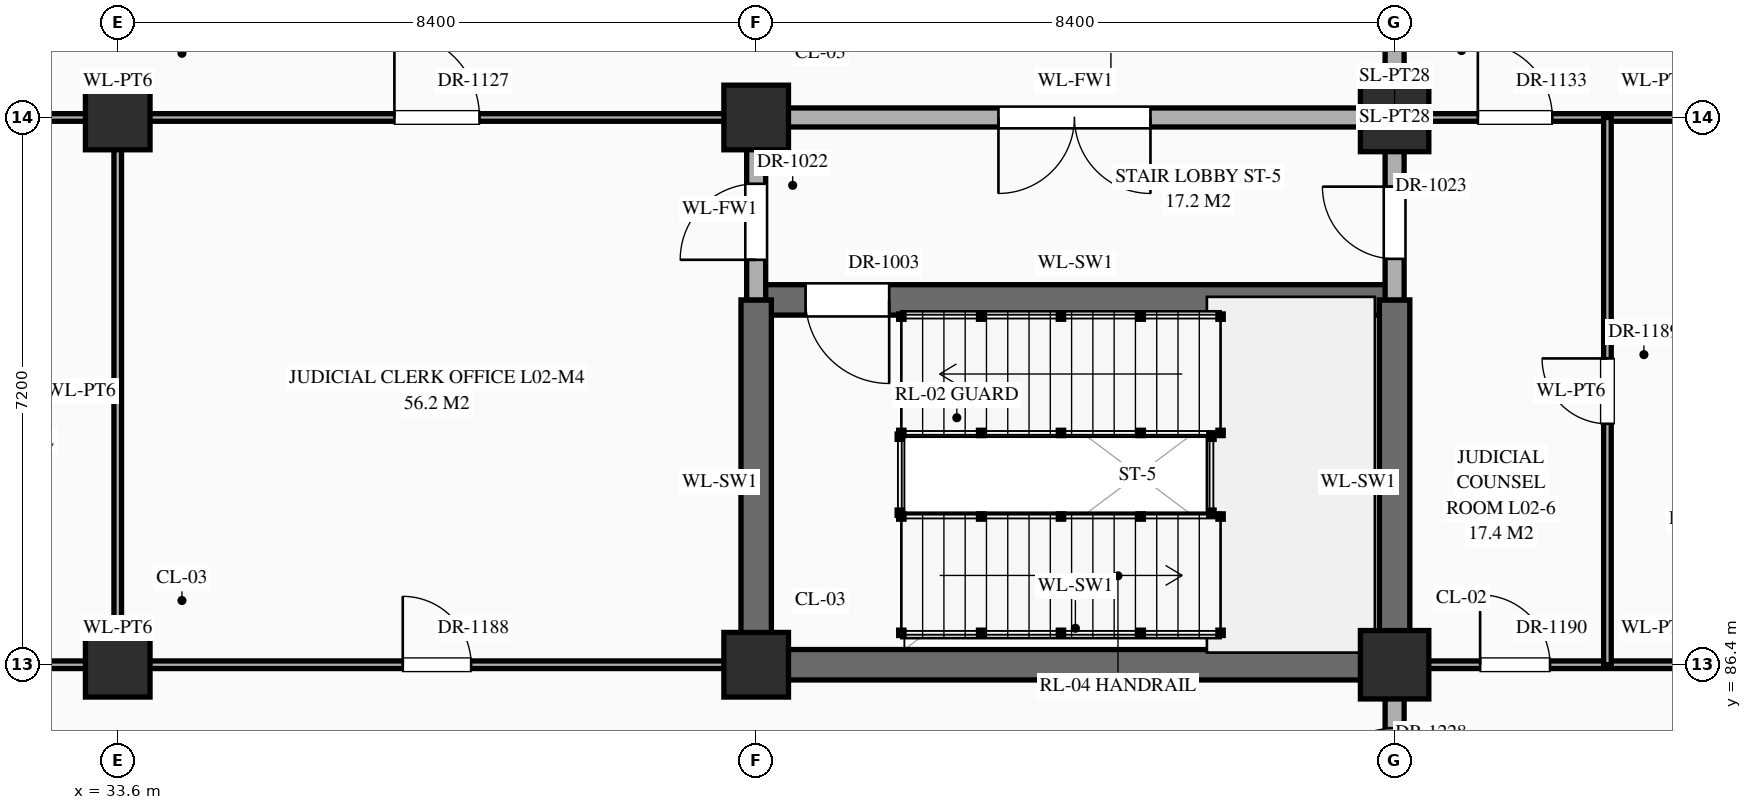
"""IFC4 building model, lengths in metres.
Left out: names, types, materials, properties, quantities, classifications, styles, units other than length and angle.
Written with IfcOpenShell. Run it as: python <this file> out.ifc"""

import sys

from ifc_helpers import new_model, si_unit, direction, frame, frame_2d, origin, origin_2d, place, context, subcontext, project, spatial, rectangle, extrude, element, fill, save


model = new_model("IFC4")
c1 = context("Model", 3, precision=1e-05, world=origin(), true_north=direction((0.0, 1.0)))
c2 = subcontext(c1, "Body", "Model", "MODEL_VIEW")
j1 = project(units=[si_unit("LENGTHUNIT", "METRE"), si_unit("PLANEANGLEUNIT", "RADIAN")], contexts=[c1])
p1 = place(None, origin())
s1 = spatial("IfcSite", under=j1, at=p1, CompositionType="ELEMENT")
p2 = place(p1, origin())
s2 = spatial("IfcBuilding", under=s1, at=p2, CompositionType="ELEMENT")
p3 = place(p2, frame((0.0, 0.0, 5.4)))
s3 = spatial("IfcBuildingStorey", under=s2, at=p3, CompositionType="ELEMENT", Elevation=5.4)
for number, where, z_axis, x_axis in (
    (1, (33.6, 86.4, 0.0), (0.0, 0.0, 1.0), (1.0, 0.0, 0.0)),
    (2, (33.6, 93.6, 0.0), (0.0, 0.0, 1.0), (1.0, 0.0, 0.0)),
    (3, (42.0, 86.4, 0.0), (0.0, 0.0, 1.0), (1.0, 0.0, 0.0)),
    (4, (42.0, 93.6, 0.0), (0.0, 0.0, 1.0), (1.0, 0.0, 0.0)),
):
    element("IfcColumn", number, at=place(p3, frame(where, z_axis=z_axis, x_axis=x_axis)), inside=s3, PredefinedType="COLUMN", context=c2, shape_type="SweptSolid", body=[
        extrude(rectangle(XDim=0.85, YDim=0.85, at=origin_2d()), origin(), (0.0, 0.0, 1.0), 5.4),
    ])
for number, where, z_axis, x_axis in (
    (5, (50.4, 86.4, 0.0), (0.0, 0.0, 1.0), (1.0, 0.0, 0.0)),
    (6, (50.4, 93.6, 0.0), (0.0, 0.0, 1.0), (1.0, 0.0, 0.0)),
):
    element("IfcColumn", number, at=place(p3, frame(where, z_axis=z_axis, x_axis=x_axis)), inside=s3, PredefinedType="COLUMN", context=c2, shape_type="SweptSolid", body=[
        extrude(rectangle(XDim=0.9, YDim=0.9, at=origin_2d()), origin(), (0.0, 0.0, 1.0), 5.4),
    ])
p4 = place(p3, frame((25.2, 86.4, 0.0), z_axis=(0.0, 0.0, 1.0), x_axis=(1.0, 0.0, 0.0)))
e7 = element("IfcWall", 7, at=p4, inside=s3, PredefinedType="STANDARD", context=c2, shape_type="SweptSolid", body=[
    extrude(rectangle(XDim=16.8, YDim=0.1, at=frame_2d((8.4, 0.0))), origin(), (0.0, 0.0, 1.0), 4.27),
])
p5 = place(p4, frame((1.083, 0.0, 0.0)))
e8 = element("IfcOpeningElement", 8, at=p5, cuts=e7, PredefinedType="OPENING", context=c2, shape_type="SweptSolid", body=[
    extrude(rectangle(XDim=0.98, YDim=2.35, at=frame_2d((0.49, 1.175))), frame((0.0, 0.062, 0.0), z_axis=(0.0, -1.0, 0.0), x_axis=(1.0, 0.0, 0.0)), (0.0, 0.0, 1.0), 0.124),
])
p6 = place(p4, frame((3.3, 0.0, 0.0)))
e9 = element("IfcOpeningElement", 9, at=p6, cuts=e7, PredefinedType="OPENING", context=c2, shape_type="SweptSolid", body=[
    extrude(rectangle(XDim=1.8, YDim=2.5, at=frame_2d((0.9, 1.25))), frame((0.0, 0.062, 0.0), z_axis=(0.0, -1.0, 0.0), x_axis=(1.0, 0.0, 0.0)), (0.0, 0.0, 1.0), 0.124),
])
p7 = place(p4, frame((6.258, 0.0, 0.0)))
e10 = element("IfcOpeningElement", 10, at=p7, cuts=e7, PredefinedType="OPENING", context=c2, shape_type="SweptSolid", body=[
    extrude(rectangle(XDim=1.14, YDim=2.4, at=frame_2d((0.57, 1.2))), frame((0.0, 0.062, 0.0), z_axis=(0.0, -1.0, 0.0), x_axis=(1.0, 0.0, 0.0)), (0.0, 0.0, 1.0), 0.124),
])
p8 = place(p4, frame((12.15, 0.0, 0.0)))
e11 = element("IfcOpeningElement", 11, at=p8, cuts=e7, PredefinedType="OPENING", context=c2, shape_type="SweptSolid", body=[
    extrude(rectangle(XDim=0.9, YDim=2.15, at=frame_2d((0.45, 1.075))), frame((0.0, 0.062, 0.0), z_axis=(0.0, -1.0, 0.0), x_axis=(1.0, 0.0, 0.0)), (0.0, 0.0, 1.0), 0.124),
])
p9 = place(p3, frame((42.0, 86.4, 0.0), z_axis=(0.0, 0.0, 1.0), x_axis=(1.0, 0.0, 0.0)))
e12 = element("IfcWall", 12, at=p9, inside=s3, PredefinedType="SHEAR", context=c2, shape_type="SweptSolid", body=[
    extrude(rectangle(XDim=8.4, YDim=0.4, at=frame_2d((4.2, 0.0))), origin(), (0.0, 0.0, 1.0), 5.12),
])
p10 = place(p3, frame((50.4, 86.4, 0.0), z_axis=(0.0, 0.0, 1.0), x_axis=(1.0, 0.0, 0.0)))
e13 = element("IfcWall", 13, at=p10, inside=s3, PredefinedType="STANDARD", context=c2, shape_type="SweptSolid", body=[
    extrude(rectangle(XDim=8.4, YDim=0.1, at=frame_2d((4.2, 0.0))), origin(), (0.0, 0.0, 1.0), 4.27),
])
p11 = place(p10, frame((1.125, 0.0, 0.0)))
e14 = element("IfcOpeningElement", 14, at=p11, cuts=e13, PredefinedType="OPENING", context=c2, shape_type="SweptSolid", body=[
    extrude(rectangle(XDim=0.92, YDim=2.15, at=frame_2d((0.46, 1.075))), frame((0.0, 0.062, 0.0), z_axis=(0.0, -1.0, 0.0), x_axis=(1.0, 0.0, 0.0)), (0.0, 0.0, 1.0), 0.124),
])
p12 = place(p10, frame((3.7, 0.0, 0.0)))
e15 = element("IfcOpeningElement", 15, at=p12, cuts=e13, PredefinedType="OPENING", context=c2, shape_type="SweptSolid", body=[
    extrude(rectangle(XDim=1.0, YDim=2.25, at=frame_2d((0.5, 1.125))), frame((0.0, 0.062, 0.0), z_axis=(0.0, -1.0, 0.0), x_axis=(1.0, 0.0, 0.0)), (0.0, 0.0, 1.0), 0.124),
])
p13 = place(p10, frame((6.295, 0.0, 0.0)))
e16 = element("IfcOpeningElement", 16, at=p13, cuts=e13, PredefinedType="OPENING", context=c2, shape_type="SweptSolid", body=[
    extrude(rectangle(XDim=1.04, YDim=2.2, at=frame_2d((0.52, 1.1))), frame((0.0, 0.062, 0.0), z_axis=(0.0, -1.0, 0.0), x_axis=(1.0, 0.0, 0.0)), (0.0, 0.0, 1.0), 0.124),
])
p14 = place(p3, frame((42.0, 91.2, 0.0), z_axis=(0.0, 0.0, 1.0), x_axis=(1.0, 0.0, 0.0)))
e17 = element("IfcWall", 17, at=p14, inside=s3, PredefinedType="SHEAR", context=c2, shape_type="SweptSolid", body=[
    extrude(rectangle(XDim=8.4, YDim=0.4, at=frame_2d((4.2, 0.0))), origin(), (0.0, 0.0, 1.0), 5.12),
])
p15 = place(p14, frame((0.65, 0.0, 0.0)))
e18 = element("IfcOpeningElement", 18, at=p15, cuts=e17, PredefinedType="OPENING", context=c2, shape_type="SweptSolid", body=[
    extrude(rectangle(XDim=1.1, YDim=2.2, at=frame_2d((0.55, 1.1))), frame((0.0, 0.212, 0.0), z_axis=(0.0, -1.0, 0.0), x_axis=(1.0, 0.0, 0.0)), (0.0, 0.0, 1.0), 0.424),
])
p16 = place(p3, frame((25.2, 93.6, 0.0), z_axis=(0.0, 0.0, 1.0), x_axis=(1.0, 0.0, 0.0)))
e19 = element("IfcWall", 19, at=p16, inside=s3, PredefinedType="STANDARD", context=c2, shape_type="SweptSolid", body=[
    extrude(rectangle(XDim=16.8, YDim=0.1, at=frame_2d((8.4, 0.0))), origin(), (0.0, 0.0, 1.0), 4.27),
])
p17 = place(p16, frame((1.073, 0.0, 0.0)))
e20 = element("IfcOpeningElement", 20, at=p17, cuts=e19, PredefinedType="OPENING", context=c2, shape_type="SweptSolid", body=[
    extrude(rectangle(XDim=1.0, YDim=2.25, at=frame_2d((0.5, 1.125))), frame((0.0, 0.062, 0.0), z_axis=(0.0, -1.0, 0.0), x_axis=(1.0, 0.0, 0.0)), (0.0, 0.0, 1.0), 0.124),
])
p18 = place(p16, frame((3.25, 0.0, 0.0)))
e21 = element("IfcOpeningElement", 21, at=p18, cuts=e19, PredefinedType="OPENING", context=c2, shape_type="SweptSolid", body=[
    extrude(rectangle(XDim=1.9, YDim=2.5, at=frame_2d((0.95, 1.25))), frame((0.0, 0.062, 0.0), z_axis=(0.0, -1.0, 0.0), x_axis=(1.0, 0.0, 0.0)), (0.0, 0.0, 1.0), 0.124),
])
p19 = place(p16, frame((6.288, 0.0, 0.0)))
e22 = element("IfcOpeningElement", 22, at=p19, cuts=e19, PredefinedType="OPENING", context=c2, shape_type="SweptSolid", body=[
    extrude(rectangle(XDim=1.08, YDim=2.25, at=frame_2d((0.54, 1.125))), frame((0.0, 0.062, 0.0), z_axis=(0.0, -1.0, 0.0), x_axis=(1.0, 0.0, 0.0)), (0.0, 0.0, 1.0), 0.124),
])
p20 = place(p16, frame((12.04, 0.0, 0.0)))
e23 = element("IfcOpeningElement", 23, at=p20, cuts=e19, PredefinedType="OPENING", context=c2, shape_type="SweptSolid", body=[
    extrude(rectangle(XDim=1.12, YDim=2.25, at=frame_2d((0.56, 1.125))), frame((0.0, 0.062, 0.0), z_axis=(0.0, -1.0, 0.0), x_axis=(1.0, 0.0, 0.0)), (0.0, 0.0, 1.0), 0.124),
])
p21 = place(p3, frame((42.0, 93.6, 0.0), z_axis=(0.0, 0.0, 1.0), x_axis=(1.0, 0.0, 0.0)))
e24 = element("IfcWall", 24, at=p21, inside=s3, PredefinedType="STANDARD", context=c2, shape_type="SweptSolid", body=[
    extrude(rectangle(XDim=8.4, YDim=0.25, at=frame_2d((4.2, 0.0))), origin(), (0.0, 0.0, 1.0), 4.27),
])
p22 = place(p21, frame((3.188, 0.0, 0.0)))
e25 = element("IfcOpeningElement", 25, at=p22, cuts=e24, PredefinedType="OPENING", context=c2, shape_type="SweptSolid", body=[
    extrude(rectangle(XDim=2.0, YDim=2.4, at=frame_2d((1.0, 1.2))), frame((0.0, 0.137, 0.0), z_axis=(0.0, -1.0, 0.0), x_axis=(1.0, 0.0, 0.0)), (0.0, 0.0, 1.0), 0.274),
])
p23 = place(p3, frame((50.4, 93.6, 0.0), z_axis=(0.0, 0.0, 1.0), x_axis=(1.0, 0.0, 0.0)))
e26 = element("IfcWall", 26, at=p23, inside=s3, PredefinedType="STANDARD", context=c2, shape_type="SweptSolid", body=[
    extrude(rectangle(XDim=8.4, YDim=0.1, at=frame_2d((4.2, 0.0))), origin(), (0.0, 0.0, 1.0), 4.27),
])
p24 = place(p23, frame((1.095, 0.0, 0.0)))
e27 = element("IfcOpeningElement", 27, at=p24, cuts=e26, PredefinedType="OPENING", context=c2, shape_type="SweptSolid", body=[
    extrude(rectangle(XDim=0.98, YDim=2.35, at=frame_2d((0.49, 1.175))), frame((0.0, 0.062, 0.0), z_axis=(0.0, -1.0, 0.0), x_axis=(1.0, 0.0, 0.0)), (0.0, 0.0, 1.0), 0.124),
])
p25 = place(p23, frame((3.69, 0.0, 0.0)))
e28 = element("IfcOpeningElement", 28, at=p25, cuts=e26, PredefinedType="OPENING", context=c2, shape_type="SweptSolid", body=[
    extrude(rectangle(XDim=1.02, YDim=2.4, at=frame_2d((0.51, 1.2))), frame((0.0, 0.062, 0.0), z_axis=(0.0, -1.0, 0.0), x_axis=(1.0, 0.0, 0.0)), (0.0, 0.0, 1.0), 0.124),
])
p26 = place(p23, frame((6.285, 0.0, 0.0)))
e29 = element("IfcOpeningElement", 29, at=p26, cuts=e26, PredefinedType="OPENING", context=c2, shape_type="SweptSolid", body=[
    extrude(rectangle(XDim=1.06, YDim=2.4, at=frame_2d((0.53, 1.2))), frame((0.0, 0.062, 0.0), z_axis=(0.0, -1.0, 0.0), x_axis=(1.0, 0.0, 0.0)), (0.0, 0.0, 1.0), 0.124),
])
p27 = place(p3, frame((33.6, 86.4, 0.0), z_axis=(0.0, 0.0, 1.0), x_axis=(0.0, 1.0, 0.0)))
e30 = element("IfcWall", 30, at=p27, inside=s3, PredefinedType="STANDARD", context=c2, shape_type="SweptSolid", body=[
    extrude(rectangle(XDim=7.2, YDim=0.1, at=frame_2d((3.6, 0.0))), origin(), (0.0, 0.0, 1.0), 4.37),
])
p28 = place(p3, frame((42.0, 86.4, 0.0), z_axis=(0.0, 0.0, 1.0), x_axis=(0.0, 1.0, 0.0)))
e31 = element("IfcWall", 31, at=p28, inside=s3, PredefinedType="SHEAR", context=c2, shape_type="SweptSolid", body=[
    extrude(rectangle(XDim=4.8, YDim=0.4, at=frame_2d((2.4, 0.0))), origin(), (0.0, 0.0, 1.0), 5.12),
])
p29 = place(p3, frame((42.0, 91.2, 0.0), z_axis=(0.0, 0.0, 1.0), x_axis=(0.0, 1.0, 0.0)))
e32 = element("IfcWall", 32, at=p29, inside=s3, PredefinedType="STANDARD", context=c2, shape_type="SweptSolid", body=[
    extrude(rectangle(XDim=2.4, YDim=0.25, at=frame_2d((1.2, 0.0))), origin(), (0.0, 0.0, 1.0), 4.37),
])
p30 = place(p29, frame((0.528, 0.0, 0.0)))
e33 = element("IfcOpeningElement", 33, at=p30, cuts=e32, PredefinedType="OPENING", context=c2, shape_type="SweptSolid", body=[
    extrude(rectangle(XDim=1.0, YDim=2.2, at=frame_2d((0.5, 1.1))), frame((0.0, 0.137, 0.0), z_axis=(0.0, -1.0, 0.0), x_axis=(1.0, 0.0, 0.0)), (0.0, 0.0, 1.0), 0.274),
])
p31 = place(p3, frame((50.4, 79.24, 0.0), z_axis=(0.0, 0.0, 1.0), x_axis=(0.0, 1.0, 0.0)))
e34 = element("IfcWall", 34, at=p31, inside=s3, PredefinedType="STANDARD", context=c2, shape_type="SweptSolid", body=[
    extrude(rectangle(XDim=7.16, YDim=0.25, at=frame_2d((3.58, 0.0))), origin(), (0.0, 0.0, 1.0), 4.37),
])
p32 = place(p31, frame((5.225, 0.0, 0.0)))
e35 = element("IfcOpeningElement", 35, at=p32, cuts=e34, PredefinedType="OPENING", context=c2, shape_type="SweptSolid", body=[
    extrude(rectangle(XDim=1.1, YDim=2.2, at=frame_2d((0.55, 1.1))), frame((0.0, 0.137, 0.0), z_axis=(0.0, -1.0, 0.0), x_axis=(1.0, 0.0, 0.0)), (0.0, 0.0, 1.0), 0.274),
])
p33 = place(p3, frame((50.4, 86.4, 0.0), z_axis=(0.0, 0.0, 1.0), x_axis=(0.0, 1.0, 0.0)))
e36 = element("IfcWall", 36, at=p33, inside=s3, PredefinedType="SHEAR", context=c2, shape_type="SweptSolid", body=[
    extrude(rectangle(XDim=4.8, YDim=0.4, at=frame_2d((2.4, 0.0))), origin(), (0.0, 0.0, 1.0), 5.12),
])
p34 = place(p3, frame((50.4, 91.2, 0.0), z_axis=(0.0, 0.0, 1.0), x_axis=(0.0, 1.0, 0.0)))
e37 = element("IfcWall", 37, at=p34, inside=s3, PredefinedType="STANDARD", context=c2, shape_type="SweptSolid", body=[
    extrude(rectangle(XDim=13.2, YDim=0.25, at=frame_2d((6.6, 0.0))), origin(), (0.0, 0.0, 1.0), 4.37),
])
p35 = place(p34, frame((0.54, 0.0, 0.0)))
e38 = element("IfcOpeningElement", 38, at=p35, cuts=e37, PredefinedType="OPENING", context=c2, shape_type="SweptSolid", body=[
    extrude(rectangle(XDim=0.95, YDim=2.15, at=frame_2d((0.475, 1.075))), frame((0.0, 0.137, 0.0), z_axis=(0.0, -1.0, 0.0), x_axis=(1.0, 0.0, 0.0)), (0.0, 0.0, 1.0), 0.274),
])
p36 = place(p34, frame((10.51, 0.0, 0.0)))
e39 = element("IfcOpeningElement", 39, at=p36, cuts=e37, PredefinedType="OPENING", context=c2, shape_type="SweptSolid", body=[
    extrude(rectangle(XDim=0.95, YDim=2.15, at=frame_2d((0.475, 1.075))), frame((0.0, 0.137, 0.0), z_axis=(0.0, -1.0, 0.0), x_axis=(1.0, 0.0, 0.0)), (0.0, 0.0, 1.0), 0.274),
])
p37 = place(p34, frame((3.285, 0.0, 0.0)))
e40 = element("IfcOpeningElement", 40, at=p37, cuts=e37, PredefinedType="OPENING", context=c2, shape_type="SweptSolid", body=[
    extrude(rectangle(XDim=1.0, YDim=2.2, at=frame_2d((0.5, 1.1))), frame((0.0, 0.137, 0.0), z_axis=(0.0, -1.0, 0.0), x_axis=(1.0, 0.0, 0.0)), (0.0, 0.0, 1.0), 0.274),
])
p38 = place(p3, frame((53.2, 86.4, 0.0), z_axis=(0.0, 0.0, 1.0), x_axis=(0.0, 1.0, 0.0)))
e41 = element("IfcWall", 41, at=p38, inside=s3, PredefinedType="STANDARD", context=c2, shape_type="SweptSolid", body=[
    extrude(rectangle(XDim=7.2, YDim=0.1, at=frame_2d((3.6, 0.0))), origin(), (0.0, 0.0, 1.0), 5.12),
])
p39 = place(p38, frame((3.17, 0.0, 0.0)))
e42 = element("IfcOpeningElement", 42, at=p39, cuts=e41, PredefinedType="OPENING", context=c2, shape_type="SweptSolid", body=[
    extrude(rectangle(XDim=0.86, YDim=2.1, at=frame_2d((0.43, 1.05))), frame((0.0, 0.062, 0.0), z_axis=(0.0, -1.0, 0.0), x_axis=(1.0, 0.0, 0.0)), (0.0, 0.0, 1.0), 0.124),
])
p40 = place(p15, frame((1.1, 0.0, 0.0), z_axis=(0.0, 0.0, 1.0), x_axis=(-1.0, 0.0, 0.0)))
e43 = element("IfcDoor", 43, at=p40, inside=s3, OperationType="SINGLE_SWING_LEFT", PredefinedType="DOOR", context=c2, shape_type="SweptSolid", body=[
    extrude(rectangle(XDim=1.1, YDim=2.2, at=frame_2d((0.55, 1.1))), frame((0.0, 0.025, 0.0), z_axis=(0.0, -1.0, 0.0), x_axis=(1.0, 0.0, 0.0)), (0.0, 0.0, 1.0), 0.05),
])
fill(e18, e43)
p41 = place(p22, frame((2.0, 0.0, 0.0), z_axis=(0.0, 0.0, 1.0), x_axis=(-1.0, 0.0, 0.0)))
e44 = element("IfcDoor", 44, at=p41, inside=s3, OperationType="DOUBLE_DOOR_SINGLE_SWING", PredefinedType="DOOR", context=c2, shape_type="SweptSolid", body=[
    extrude(rectangle(XDim=2.0, YDim=2.4, at=frame_2d((1.0, 1.2))), frame((0.0, 0.025, 0.0), z_axis=(0.0, -1.0, 0.0), x_axis=(1.0, 0.0, 0.0)), (0.0, 0.0, 1.0), 0.05),
])
fill(e25, e44)
p42 = place(p30, origin())
e45 = element("IfcDoor", 45, at=p42, inside=s3, OperationType="SINGLE_SWING_LEFT", PredefinedType="DOOR", context=c2, shape_type="SweptSolid", body=[
    extrude(rectangle(XDim=1.0, YDim=2.2, at=frame_2d((0.5, 1.1))), frame((0.0, 0.025, 0.0), z_axis=(0.0, -1.0, 0.0), x_axis=(1.0, 0.0, 0.0)), (0.0, 0.0, 1.0), 0.05),
])
fill(e33, e45)
p43 = place(p35, origin())
e46 = element("IfcDoor", 46, at=p43, inside=s3, OperationType="SINGLE_SWING_RIGHT", PredefinedType="DOOR", context=c2, shape_type="SweptSolid", body=[
    extrude(rectangle(XDim=0.95, YDim=2.15, at=frame_2d((0.475, 1.075))), frame((0.0, 0.025, 0.0), z_axis=(0.0, -1.0, 0.0), x_axis=(1.0, 0.0, 0.0)), (0.0, 0.0, 1.0), 0.05),
])
fill(e38, e46)
p44 = place(p20, origin())
e47 = element("IfcDoor", 47, at=p44, inside=s3, OperationType="SINGLE_SWING_LEFT", PredefinedType="DOOR", context=c2, shape_type="SweptSolid", body=[
    extrude(rectangle(XDim=1.12, YDim=2.25, at=frame_2d((0.56, 1.125))), frame((0.0, 0.025, 0.0), z_axis=(0.0, -1.0, 0.0), x_axis=(1.0, 0.0, 0.0)), (0.0, 0.0, 1.0), 0.05),
])
fill(e23, e47)
p45 = place(p24, origin())
e48 = element("IfcDoor", 48, at=p45, inside=s3, OperationType="SINGLE_SWING_LEFT", PredefinedType="DOOR", context=c2, shape_type="SweptSolid", body=[
    extrude(rectangle(XDim=0.98, YDim=2.35, at=frame_2d((0.49, 1.175))), frame((0.0, 0.025, 0.0), z_axis=(0.0, -1.0, 0.0), x_axis=(1.0, 0.0, 0.0)), (0.0, 0.0, 1.0), 0.05),
])
fill(e27, e48)
p46 = place(p8, origin())
e49 = element("IfcDoor", 49, at=p46, inside=s3, OperationType="SINGLE_SWING_LEFT", PredefinedType="DOOR", context=c2, shape_type="SweptSolid", body=[
    extrude(rectangle(XDim=0.9, YDim=2.15, at=frame_2d((0.45, 1.075))), frame((0.0, 0.025, 0.0), z_axis=(0.0, -1.0, 0.0), x_axis=(1.0, 0.0, 0.0)), (0.0, 0.0, 1.0), 0.05),
])
fill(e11, e49)
p47 = place(p39, origin())
e50 = element("IfcDoor", 50, at=p47, inside=s3, OperationType="SINGLE_SWING_RIGHT", PredefinedType="DOOR", context=c2, shape_type="SweptSolid", body=[
    extrude(rectangle(XDim=0.86, YDim=2.1, at=frame_2d((0.43, 1.05))), frame((0.0, 0.025, 0.0), z_axis=(0.0, -1.0, 0.0), x_axis=(1.0, 0.0, 0.0)), (0.0, 0.0, 1.0), 0.05),
])
fill(e42, e50)
p48 = place(p11, origin())
e51 = element("IfcDoor", 51, at=p48, inside=s3, OperationType="SINGLE_SWING_LEFT", PredefinedType="DOOR", context=c2, shape_type="SweptSolid", body=[
    extrude(rectangle(XDim=0.92, YDim=2.15, at=frame_2d((0.46, 1.075))), frame((0.0, 0.025, 0.0), z_axis=(0.0, -1.0, 0.0), x_axis=(1.0, 0.0, 0.0)), (0.0, 0.0, 1.0), 0.05),
])
fill(e14, e51)
p49 = place(p32, origin())
e52 = element("IfcDoor", 52, at=p49, inside=s3, OperationType="SINGLE_SWING_LEFT", PredefinedType="DOOR", context=c2, shape_type="SweptSolid", body=[
    extrude(rectangle(XDim=1.1, YDim=2.2, at=frame_2d((0.55, 1.1))), frame((0.0, 0.025, 0.0), z_axis=(0.0, -1.0, 0.0), x_axis=(1.0, 0.0, 0.0)), (0.0, 0.0, 1.0), 0.05),
])
fill(e35, e52)
save(model, sys.argv[1])
